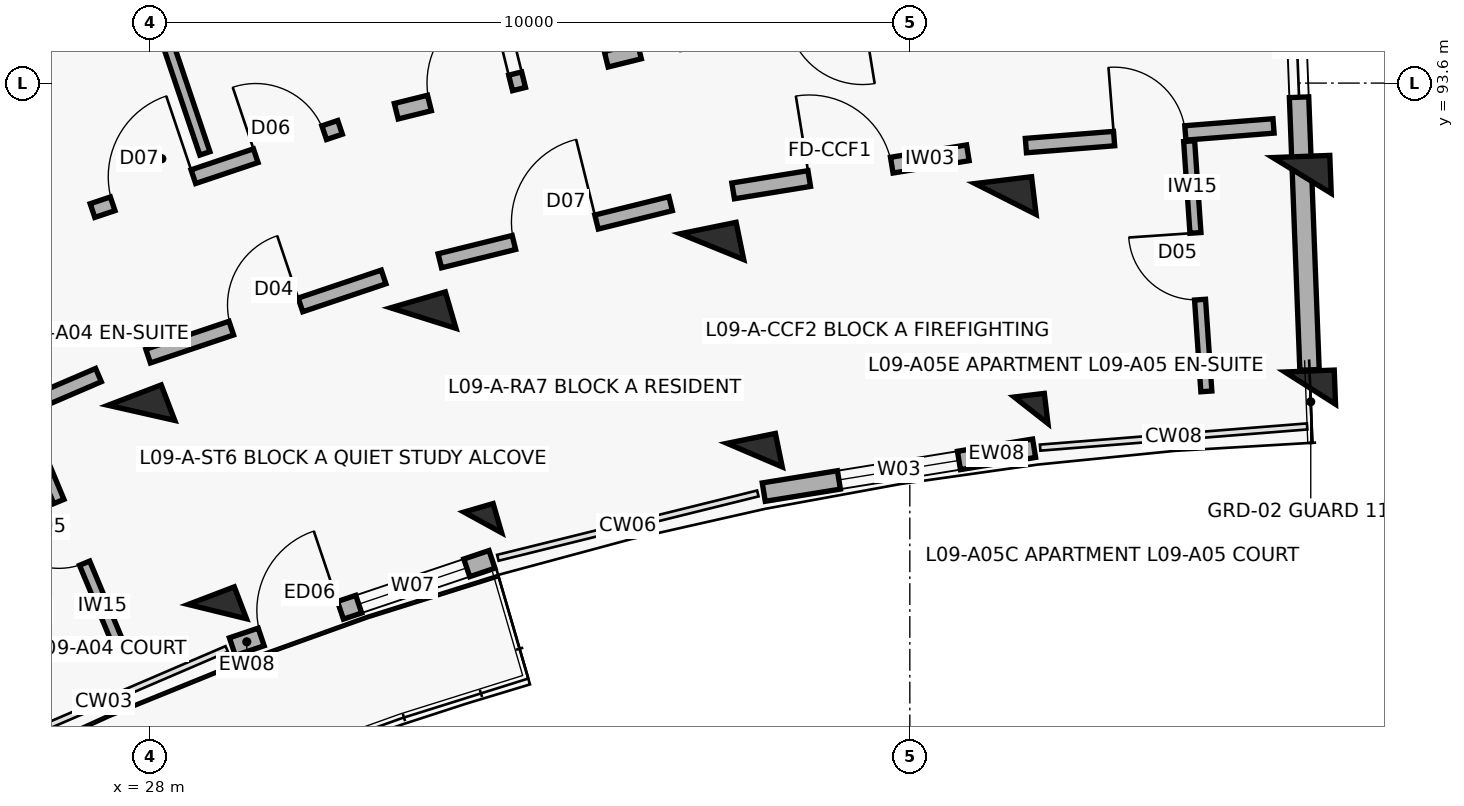
"""IFC4 building model, lengths in metres.
Left out: names, types, materials, properties, quantities, classifications, styles, units other than length and angle.
Written with IfcOpenShell. Run it as: python <this file> out.ifc"""

import sys

from ifc_helpers import new_model, si_unit, direction, frame, frame_2d, origin, origin_2d, place, context, subcontext, project, spatial, rectangle, extrude, element, fill, save


model = new_model("IFC4")
c1 = context("Model", 3, precision=1e-05, world=origin(), true_north=direction((0.0, 1.0)))
c2 = subcontext(c1, "Body", "Model", "MODEL_VIEW")
j1 = project(units=[si_unit("LENGTHUNIT", "METRE"), si_unit("PLANEANGLEUNIT", "RADIAN")], contexts=[c1])
p1 = place(None, origin())
s1 = spatial("IfcSite", under=j1, at=p1, CompositionType="ELEMENT")
p2 = place(p1, origin())
s2 = spatial("IfcBuilding", under=s1, at=p2, CompositionType="ELEMENT")
p3 = place(p2, frame((0.0, 0.0, 29.8)))
s3 = spatial("IfcBuildingStorey", under=s2, at=p3, CompositionType="ELEMENT", Elevation=29.8)
p4 = place(p3, frame((28.889, 86.646, 0.0), z_axis=(0.0, 0.0, 1.0), x_axis=(-0.357064076459, 0.934079892355, 0.0)))
e1 = element("IfcColumn", 1, at=p4, inside=s3, PredefinedType="COLUMN", context=c2, shape_type="SweptSolid", body=[
    extrude(rectangle(XDim=0.45, YDim=0.65, at=origin_2d()), origin(), (0.0, 0.0, 1.0), 3.1),
])
p5 = place(p3, frame((27.889, 89.261, 0.0), z_axis=(0.0, 0.0, 1.0), x_axis=(-0.357064076459, 0.934079892355, 0.0)))
e2 = element("IfcColumn", 2, at=p5, inside=s3, PredefinedType="COLUMN", context=c2, shape_type="SweptSolid", body=[
    extrude(rectangle(XDim=0.5, YDim=0.75, at=origin_2d()), origin(), (0.0, 0.0, 1.0), 3.1),
])
p6 = place(p3, frame((32.382, 87.82, 0.0), z_axis=(0.0, 0.0, 1.0), x_axis=(-0.27966144946, 0.96009867914, 0.0)))
e3 = element("IfcColumn", 3, at=p6, inside=s3, PredefinedType="COLUMN", context=c2, shape_type="SweptSolid", body=[
    extrude(rectangle(XDim=0.4, YDim=0.4, at=origin_2d()), origin(), (0.0, 0.0, 1.0), 3.1),
])
p7 = place(p3, frame((31.599, 90.508, 0.0), z_axis=(0.0, 0.0, 1.0), x_axis=(-0.27966144946, 0.96009867914, 0.0)))
e4 = element("IfcColumn", 4, at=p7, inside=s3, PredefinedType="COLUMN", context=c2, shape_type="SweptSolid", body=[
    extrude(rectangle(XDim=0.5, YDim=0.75, at=origin_2d()), origin(), (0.0, 0.0, 1.0), 3.1),
])
p8 = place(p3, frame((35.958, 88.705, 0.0), z_axis=(0.0, 0.0, 1.0), x_axis=(-0.200393999665, 0.979715389742, 0.0)))
e5 = element("IfcColumn", 5, at=p8, inside=s3, PredefinedType="COLUMN", context=c2, shape_type="SweptSolid", body=[
    extrude(rectangle(XDim=0.45, YDim=0.65, at=origin_2d()), origin(), (0.0, 0.0, 1.0), 3.1),
])
p9 = place(p3, frame((35.397, 91.448, 0.0), z_axis=(0.0, 0.0, 1.0), x_axis=(-0.200393999665, 0.979715389742, 0.0)))
e6 = element("IfcColumn", 6, at=p9, inside=s3, PredefinedType="COLUMN", context=c2, shape_type="SweptSolid", body=[
    extrude(rectangle(XDim=0.5, YDim=0.75, at=origin_2d()), origin(), (0.0, 0.0, 1.0), 3.1),
])
p10 = place(p3, frame((39.595, 89.295, 0.0), z_axis=(0.0, 0.0, 1.0), x_axis=(-0.119790293837, 0.992799217114, 0.0)))
e7 = element("IfcColumn", 7, at=p10, inside=s3, PredefinedType="COLUMN", context=c2, shape_type="SweptSolid", body=[
    extrude(rectangle(XDim=0.4, YDim=0.4, at=origin_2d()), origin(), (0.0, 0.0, 1.0), 3.1),
])
p11 = place(p3, frame((39.26, 92.075, 0.0), z_axis=(0.0, 0.0, 1.0), x_axis=(-0.119790293837, 0.992799217114, 0.0)))
e8 = element("IfcColumn", 8, at=p11, inside=s3, PredefinedType="COLUMN", context=c2, shape_type="SweptSolid", body=[
    extrude(rectangle(XDim=0.5, YDim=0.75, at=origin_2d()), origin(), (0.0, 0.0, 1.0), 3.1),
])
p12 = place(p3, frame((43.268, 89.587, 0.0), z_axis=(0.0, 0.0, 1.0), x_axis=(-0.038387809088, 0.999262916411, 0.0)))
e9 = element("IfcColumn", 9, at=p12, inside=s3, PredefinedType="COLUMN", context=c2, shape_type="SweptSolid", body=[
    extrude(rectangle(XDim=0.45, YDim=0.65, at=origin_2d()), origin(), (0.0, 0.0, 1.0), 3.1),
])
p13 = place(p3, frame((43.16, 92.385, 0.0), z_axis=(0.0, 0.0, 1.0), x_axis=(-0.038387809088, 0.999262916411, 0.0)))
e10 = element("IfcColumn", 10, at=p13, inside=s3, PredefinedType="COLUMN", context=c2, shape_type="SweptSolid", body=[
    extrude(rectangle(XDim=0.5, YDim=0.75, at=origin_2d()), origin(), (0.0, 0.0, 1.0), 3.1),
])
p14 = place(p3, frame((29.087, 86.185, 0.0), z_axis=(0.0, 0.0, 1.0), x_axis=(0.947880824442, 0.318625081649, 0.0)))
e11 = element("IfcWall", 11, at=p14, inside=s3, PredefinedType="SOLIDWALL", context=c2, shape_type="SweptSolid", body=[
    extrude(rectangle(XDim=3.604, YDim=0.245, at=frame_2d((1.802, 0.0))), origin(), (0.0, 0.0, 1.0), 2.25),
])
p15 = place(p14, frame((0.4, 0.0, 0.0)))
e12 = element("IfcOpeningElement", 12, at=p15, cuts=e11, PredefinedType="OPENING", context=c2, shape_type="SweptSolid", body=[
    extrude(rectangle(XDim=1.1, YDim=2.15, at=frame_2d((0.55, 1.075))), frame((0.0, 0.133, 0.0), z_axis=(0.0, -1.0, 0.0), x_axis=(1.0, 0.0, 0.0)), (0.0, 0.0, 1.0), 0.265),
])
p16 = place(p14, frame((1.754, 0.0, 0.35)))
e13 = element("IfcOpeningElement", 13, at=p16, cuts=e11, PredefinedType="OPENING", context=c2, shape_type="SweptSolid", body=[
    extrude(rectangle(XDim=1.5, YDim=1.65, at=frame_2d((0.75, 0.825))), frame((0.0, 0.133, 0.0), z_axis=(0.0, -1.0, 0.0), x_axis=(1.0, 0.0, 0.0)), (0.0, 0.0, 1.0), 0.265),
])
p17 = place(p3, frame((36.078, 88.218, 0.0), z_axis=(0.0, 0.0, 1.0), x_axis=(0.987080874485, 0.160222804952, 0.0)))
e14 = element("IfcWall", 14, at=p17, inside=s3, PredefinedType="SOLIDWALL", context=c2, shape_type="SweptSolid", body=[
    extrude(rectangle(XDim=3.604, YDim=0.245, at=frame_2d((1.802, 0.0))), origin(), (0.0, 0.0, 1.0), 2.25),
])
p18 = place(p17, frame((1.002, 0.0, 0.32)))
e15 = element("IfcOpeningElement", 15, at=p18, cuts=e14, PredefinedType="OPENING", context=c2, shape_type="SweptSolid", body=[
    extrude(rectangle(XDim=1.6, YDim=1.5, at=frame_2d((0.8, 0.75))), frame((0.0, 0.133, 0.0), z_axis=(0.0, -1.0, 0.0), x_axis=(1.0, 0.0, 0.0)), (0.0, 0.0, 1.0), 0.265),
])
p19 = place(p3, frame((43.259, 89.827, 0.0), z_axis=(0.0, 0.0, 1.0), x_axis=(-0.038407966241, 0.999262141847, 0.0)))
e16 = element("IfcWall", 16, at=p19, inside=s3, PredefinedType="SOLIDWALL", context=c2, shape_type="SweptSolid", body=[
    extrude(rectangle(XDim=8.2, YDim=0.255, at=frame_2d((4.1, 0.0))), origin(), (0.0, 0.0, 1.0), 2.18),
])
p20 = place(p19, frame((3.59, 0.0, 0.75)))
e17 = element("IfcOpeningElement", 17, at=p20, cuts=e16, PredefinedType="OPENING", context=c2, shape_type="SweptSolid", body=[
    extrude(rectangle(XDim=1.35, YDim=1.35, at=frame_2d((0.675, 0.675))), frame((0.0, 0.137, 0.0), z_axis=(0.0, -1.0, 0.0), x_axis=(1.0, 0.0, 0.0)), (0.0, 0.0, 1.0), 0.275),
])
p21 = place(p3, frame((24.322, 88.467, 0.0), z_axis=(0.0, 0.0, 1.0), x_axis=(0.918723391052, 0.394901672235, 0.0)))
e18 = element("IfcWall", 18, at=p21, inside=s3, PredefinedType="SOLIDWALL", context=c2, shape_type="SweptSolid", body=[
    extrude(rectangle(XDim=3.269, YDim=0.19, at=frame_2d((1.634, 0.0))), origin(), (0.0, 0.0, 1.0), 2.08),
])
p22 = place(p21, frame((1.164, 0.0, 0.0)))
e19 = element("IfcOpeningElement", 19, at=p22, cuts=e18, PredefinedType="OPENING", context=c2, shape_type="SweptSolid", body=[
    extrude(rectangle(XDim=0.94, YDim=2.1, at=frame_2d((0.47, 1.05))), frame((0.0, 0.105, 0.0), z_axis=(0.0, -1.0, 0.0), x_axis=(1.0, 0.0, 0.0)), (0.0, 0.0, 1.0), 0.21),
])
p23 = place(p3, frame((27.609, 86.166, 0.0), z_axis=(0.0, 0.0, 1.0), x_axis=(-0.385151143297, 0.922853507777, 0.0)))
e20 = element("IfcWall", 20, at=p23, inside=s3, PredefinedType="PARTITIONING", context=c2, shape_type="SweptSolid", body=[
    extrude(rectangle(XDim=3.3, YDim=0.145, at=frame_2d((1.65, 0.0))), origin(), (0.0, 0.0, 1.0), 2.08),
])
p24 = place(p23, frame((1.21, 0.0, 0.0)))
e21 = element("IfcOpeningElement", 21, at=p24, cuts=e20, PredefinedType="OPENING", context=c2, shape_type="SweptSolid", body=[
    extrude(rectangle(XDim=0.88, YDim=2.1, at=frame_2d((0.44, 1.05))), frame((0.0, 0.083, 0.0), z_axis=(0.0, -1.0, 0.0), x_axis=(1.0, 0.0, 0.0)), (0.0, 0.0, 1.0), 0.165),
])
p25 = place(p3, frame((27.247, 91.923, 0.0), z_axis=(0.0, 0.0, 1.0), x_axis=(0.947863007629, 0.318678080151, 0.0)))
e22 = element("IfcWall", 22, at=p25, inside=s3, PredefinedType="SOLIDWALL", context=c2, shape_type="SweptSolid", body=[
    extrude(rectangle(XDim=3.436, YDim=0.19, at=frame_2d((1.718, 0.0))), origin(), (0.0, 0.0, 1.0), 2.08),
])
p26 = place(p25, frame((0.28, 0.0, 0.0)))
e23 = element("IfcOpeningElement", 23, at=p26, cuts=e22, PredefinedType="OPENING", context=c2, shape_type="SweptSolid", body=[
    extrude(rectangle(XDim=1.12, YDim=2.15, at=frame_2d((0.56, 1.075))), frame((0.0, 0.105, 0.0), z_axis=(0.0, -1.0, 0.0), x_axis=(1.0, 0.0, 0.0)), (0.0, 0.0, 1.0), 0.21),
])
p27 = place(p25, frame((2.266, 0.0, 0.0)))
e24 = element("IfcOpeningElement", 24, at=p27, cuts=e22, PredefinedType="OPENING", context=c2, shape_type="SweptSolid", body=[
    extrude(rectangle(XDim=0.95, YDim=2.1, at=frame_2d((0.475, 1.05))), frame((0.0, 0.105, 0.0), z_axis=(0.0, -1.0, 0.0), x_axis=(1.0, 0.0, 0.0)), (0.0, 0.0, 1.0), 0.21),
])
p28 = place(p3, frame((27.979, 90.008, 0.0), z_axis=(0.0, 0.0, 1.0), x_axis=(0.94787351033, 0.318646839643, 0.0)))
e25 = element("IfcWall", 25, at=p28, inside=s3, PredefinedType="SOLIDWALL", context=c2, shape_type="SweptSolid", body=[
    extrude(rectangle(XDim=3.269, YDim=0.19, at=frame_2d((1.634, 0.0))), origin(), (0.0, 0.0, 1.0), 2.08),
])
p29 = place(p28, frame((1.154, 0.0, 0.0)))
e26 = element("IfcOpeningElement", 26, at=p29, cuts=e25, PredefinedType="OPENING", context=c2, shape_type="SweptSolid", body=[
    extrude(rectangle(XDim=0.96, YDim=2.1, at=frame_2d((0.48, 1.05))), frame((0.0, 0.105, 0.0), z_axis=(0.0, -1.0, 0.0), x_axis=(1.0, 0.0, 0.0)), (0.0, 0.0, 1.0), 0.21),
])
p30 = place(p3, frame((28.725, 92.675, 0.0), z_axis=(0.0, 0.0, 1.0), x_axis=(-0.320057771325, 0.947398027766, 0.0)))
e27 = element("IfcWall", 27, at=p30, inside=s3, PredefinedType="PARTITIONING", context=c2, shape_type="SweptSolid", body=[
    extrude(rectangle(XDim=7.95, YDim=0.14, at=frame_2d((3.975, 0.0))), origin(), (0.0, 0.0, 1.0), 2.08),
])
p31 = place(p30, frame((6.05, 0.0, 0.0)))
e28 = element("IfcOpeningElement", 28, at=p31, cuts=e27, PredefinedType="OPENING", context=c2, shape_type="SweptSolid", body=[
    extrude(rectangle(XDim=0.92, YDim=2.1, at=frame_2d((0.46, 1.05))), frame((0.0, 0.08, 0.0), z_axis=(0.0, -1.0, 0.0), x_axis=(1.0, 0.0, 0.0)), (0.0, 0.0, 1.0), 0.16),
])
p32 = place(p3, frame((31.243, 93.23, 0.0), z_axis=(0.0, 0.0, 1.0), x_axis=(0.970719238682, 0.240216901263, 0.0)))
e29 = element("IfcWall", 29, at=p32, inside=s3, PredefinedType="SOLIDWALL", context=c2, shape_type="SweptSolid", body=[
    extrude(rectangle(XDim=3.296, YDim=0.21, at=frame_2d((1.648, 0.0))), origin(), (0.0, 0.0, 1.0), 2.08),
])
p33 = place(p32, frame((0.45, 0.0, 0.0)))
e30 = element("IfcOpeningElement", 30, at=p33, cuts=e29, PredefinedType="OPENING", context=c2, shape_type="SweptSolid", body=[
    extrude(rectangle(XDim=1.1, YDim=2.15, at=frame_2d((0.55, 1.075))), frame((0.0, 0.115, 0.0), z_axis=(0.0, -1.0, 0.0), x_axis=(1.0, 0.0, 0.0)), (0.0, 0.0, 1.0), 0.23),
])
p34 = place(p32, frame((1.726, 0.0, 0.0)))
e31 = element("IfcOpeningElement", 31, at=p34, cuts=e29, PredefinedType="OPENING", context=c2, shape_type="SweptSolid", body=[
    extrude(rectangle(XDim=1.12, YDim=2.15, at=frame_2d((0.56, 1.075))), frame((0.0, 0.115, 0.0), z_axis=(0.0, -1.0, 0.0), x_axis=(1.0, 0.0, 0.0)), (0.0, 0.0, 1.0), 0.23),
])
p35 = place(p3, frame((31.816, 91.262, 0.0), z_axis=(0.0, 0.0, 1.0), x_axis=(0.970727194092, 0.240184751078, 0.0)))
e32 = element("IfcWall", 32, at=p35, inside=s3, PredefinedType="SOLIDWALL", context=c2, shape_type="SweptSolid", body=[
    extrude(rectangle(XDim=3.129, YDim=0.19, at=frame_2d((1.564, 0.0))), origin(), (0.0, 0.0, 1.0), 2.08),
])
p36 = place(p35, frame((1.004, 0.0, 0.0)))
e33 = element("IfcOpeningElement", 33, at=p36, cuts=e32, PredefinedType="OPENING", context=c2, shape_type="SweptSolid", body=[
    extrude(rectangle(XDim=1.12, YDim=2.15, at=frame_2d((0.56, 1.075))), frame((0.0, 0.105, 0.0), z_axis=(0.0, -1.0, 0.0), x_axis=(1.0, 0.0, 0.0)), (0.0, 0.0, 1.0), 0.21),
])
p37 = place(p3, frame((35.676, 92.181, 0.0), z_axis=(0.0, 0.0, 1.0), x_axis=(0.98707079686, 0.160284877599, 0.0)))
e34 = element("IfcWall", 34, at=p37, inside=s3, PredefinedType="SOLIDWALL", context=c2, shape_type="SweptSolid", body=[
    extrude(rectangle(XDim=3.129, YDim=0.21, at=frame_2d((1.564, 0.0))), origin(), (0.0, 0.0, 1.0), 2.08),
])
p38 = place(p37, frame((1.014, 0.0, 0.0)))
e35 = element("IfcOpeningElement", 35, at=p38, cuts=e34, PredefinedType="OPENING", context=c2, shape_type="SweptSolid", body=[
    extrude(rectangle(XDim=1.1, YDim=2.15, at=frame_2d((0.55, 1.075))), frame((0.0, 0.115, 0.0), z_axis=(0.0, -1.0, 0.0), x_axis=(1.0, 0.0, 0.0)), (0.0, 0.0, 1.0), 0.23),
])
p39 = place(p3, frame((39.527, 92.778, 0.0), z_axis=(0.0, 0.0, 1.0), x_axis=(0.99686660806, 0.07910098441, 0.0)))
e36 = element("IfcWall", 36, at=p39, inside=s3, PredefinedType="SOLIDWALL", context=c2, shape_type="SweptSolid", body=[
    extrude(rectangle(XDim=3.269, YDim=0.19, at=frame_2d((1.634, 0.0))), origin(), (0.0, 0.0, 1.0), 2.08),
])
p40 = place(p39, frame((1.164, 0.0, 0.0)))
e37 = element("IfcOpeningElement", 37, at=p40, cuts=e36, PredefinedType="OPENING", context=c2, shape_type="SweptSolid", body=[
    extrude(rectangle(XDim=0.94, YDim=2.1, at=frame_2d((0.47, 1.05))), frame((0.0, 0.105, 0.0), z_axis=(0.0, -1.0, 0.0), x_axis=(1.0, 0.0, 0.0)), (0.0, 0.0, 1.0), 0.21),
])
p41 = place(p3, frame((41.901, 89.543, 0.0), z_axis=(0.0, 0.0, 1.0), x_axis=(-0.068581194944, 0.997645538105, 0.0)))
e38 = element("IfcWall", 38, at=p41, inside=s3, PredefinedType="PARTITIONING", context=c2, shape_type="SweptSolid", body=[
    extrude(rectangle(XDim=3.3, YDim=0.145, at=frame_2d((1.65, 0.0))), origin(), (0.0, 0.0, 1.0), 2.08),
])
p42 = place(p41, frame((1.21, 0.0, 0.0)))
e39 = element("IfcOpeningElement", 39, at=p42, cuts=e38, PredefinedType="OPENING", context=c2, shape_type="SweptSolid", body=[
    extrude(rectangle(XDim=0.88, YDim=2.1, at=frame_2d((0.44, 1.05))), frame((0.0, 0.083, 0.0), z_axis=(0.0, -1.0, 0.0), x_axis=(1.0, 0.0, 0.0)), (0.0, 0.0, 1.0), 0.165),
])
p43 = place(p15, origin())
e40 = element("IfcDoor", 40, at=p43, inside=s3, OperationType="SINGLE_SWING_RIGHT", PredefinedType="DOOR", context=c2, shape_type="SweptSolid", body=[
    extrude(rectangle(XDim=1.1, YDim=2.15, at=frame_2d((0.55, 1.075))), frame((0.0, 0.025, 0.0), z_axis=(0.0, -1.0, 0.0), x_axis=(1.0, 0.0, 0.0)), (0.0, 0.0, 1.0), 0.05),
])
fill(e12, e40)
p44 = place(p16, origin())
e41 = element("IfcWindow", 41, at=p44, inside=s3, PartitioningType="DOUBLE_PANEL_VERTICAL", PredefinedType="WINDOW", context=c2, shape_type="SweptSolid", body=[
    extrude(rectangle(XDim=1.5, YDim=1.65, at=frame_2d((0.75, 0.825))), frame((0.0, 0.03, 0.0), z_axis=(0.0, -1.0, 0.0), x_axis=(1.0, 0.0, 0.0)), (0.0, 0.0, 1.0), 0.06),
])
fill(e13, e41)
p45 = place(p18, origin())
e42 = element("IfcWindow", 42, at=p45, inside=s3, PartitioningType="DOUBLE_PANEL_VERTICAL", PredefinedType="WINDOW", context=c2, shape_type="SweptSolid", body=[
    extrude(rectangle(XDim=1.6, YDim=1.5, at=frame_2d((0.8, 0.75))), frame((0.0, 0.03, 0.0), z_axis=(0.0, -1.0, 0.0), x_axis=(1.0, 0.0, 0.0)), (0.0, 0.0, 1.0), 0.06),
])
fill(e15, e42)
p46 = place(p20, origin())
e43 = element("IfcWindow", 43, at=p46, inside=s3, PartitioningType="DOUBLE_PANEL_VERTICAL", PredefinedType="WINDOW", context=c2, shape_type="SweptSolid", body=[
    extrude(rectangle(XDim=1.35, YDim=1.35, at=frame_2d((0.675, 0.675))), frame((0.0, 0.03, 0.0), z_axis=(0.0, -1.0, 0.0), x_axis=(1.0, 0.0, 0.0)), (0.0, 0.0, 1.0), 0.06),
])
fill(e17, e43)
p47 = place(p24, origin())
e44 = element("IfcDoor", 44, at=p47, inside=s3, OperationType="SINGLE_SWING_RIGHT", PredefinedType="DOOR", context=c2, shape_type="SweptSolid", body=[
    extrude(rectangle(XDim=0.88, YDim=2.1, at=frame_2d((0.44, 1.05))), frame((0.0, 0.025, 0.0), z_axis=(0.0, -1.0, 0.0), x_axis=(1.0, 0.0, 0.0)), (0.0, 0.0, 1.0), 0.05),
])
fill(e21, e44)
p48 = place(p26, origin())
e45 = element("IfcDoor", 45, at=p48, inside=s3, OperationType="SINGLE_SWING_RIGHT", PredefinedType="DOOR", context=c2, shape_type="SweptSolid", body=[
    extrude(rectangle(XDim=1.12, YDim=2.15, at=frame_2d((0.56, 1.075))), frame((0.0, 0.025, 0.0), z_axis=(0.0, -1.0, 0.0), x_axis=(1.0, 0.0, 0.0)), (0.0, 0.0, 1.0), 0.05),
])
fill(e23, e45)
p49 = place(p27, origin())
e46 = element("IfcDoor", 46, at=p49, inside=s3, OperationType="SINGLE_SWING_LEFT", PredefinedType="DOOR", context=c2, shape_type="SweptSolid", body=[
    extrude(rectangle(XDim=0.95, YDim=2.1, at=frame_2d((0.475, 1.05))), frame((0.0, 0.025, 0.0), z_axis=(0.0, -1.0, 0.0), x_axis=(1.0, 0.0, 0.0)), (0.0, 0.0, 1.0), 0.05),
])
fill(e24, e46)
p50 = place(p29, origin())
e47 = element("IfcDoor", 47, at=p50, inside=s3, OperationType="SINGLE_SWING_RIGHT", PredefinedType="DOOR", context=c2, shape_type="SweptSolid", body=[
    extrude(rectangle(XDim=0.96, YDim=2.1, at=frame_2d((0.48, 1.05))), frame((0.0, 0.025, 0.0), z_axis=(0.0, -1.0, 0.0), x_axis=(1.0, 0.0, 0.0)), (0.0, 0.0, 1.0), 0.05),
])
fill(e26, e47)
p51 = place(p33, origin())
e48 = element("IfcDoor", 48, at=p51, inside=s3, OperationType="SINGLE_SWING_RIGHT", PredefinedType="DOOR", context=c2, shape_type="SweptSolid", body=[
    extrude(rectangle(XDim=1.1, YDim=2.15, at=frame_2d((0.55, 1.075))), frame((0.0, 0.025, 0.0), z_axis=(0.0, -1.0, 0.0), x_axis=(1.0, 0.0, 0.0)), (0.0, 0.0, 1.0), 0.05),
])
fill(e30, e48)
p52 = place(p34, origin())
e49 = element("IfcDoor", 49, at=p52, inside=s3, OperationType="SINGLE_SWING_LEFT", PredefinedType="DOOR", context=c2, shape_type="SweptSolid", body=[
    extrude(rectangle(XDim=1.12, YDim=2.15, at=frame_2d((0.56, 1.075))), frame((0.0, 0.025, 0.0), z_axis=(0.0, -1.0, 0.0), x_axis=(1.0, 0.0, 0.0)), (0.0, 0.0, 1.0), 0.05),
])
fill(e31, e49)
p53 = place(p36, origin())
e50 = element("IfcDoor", 50, at=p53, inside=s3, OperationType="SINGLE_SWING_RIGHT", PredefinedType="DOOR", context=c2, shape_type="SweptSolid", body=[
    extrude(rectangle(XDim=1.12, YDim=2.15, at=frame_2d((0.56, 1.075))), frame((0.0, 0.025, 0.0), z_axis=(0.0, -1.0, 0.0), x_axis=(1.0, 0.0, 0.0)), (0.0, 0.0, 1.0), 0.05),
])
fill(e33, e50)
p54 = place(p38, origin())
e51 = element("IfcDoor", 51, at=p54, inside=s3, OperationType="SINGLE_SWING_LEFT", PredefinedType="DOOR", context=c2, shape_type="SweptSolid", body=[
    extrude(rectangle(XDim=1.1, YDim=2.15, at=frame_2d((0.55, 1.075))), frame((0.0, 0.025, 0.0), z_axis=(0.0, -1.0, 0.0), x_axis=(1.0, 0.0, 0.0)), (0.0, 0.0, 1.0), 0.05),
])
fill(e35, e51)
p55 = place(p40, origin())
e52 = element("IfcDoor", 52, at=p55, inside=s3, OperationType="SINGLE_SWING_LEFT", PredefinedType="DOOR", context=c2, shape_type="SweptSolid", body=[
    extrude(rectangle(XDim=0.94, YDim=2.1, at=frame_2d((0.47, 1.05))), frame((0.0, 0.025, 0.0), z_axis=(0.0, -1.0, 0.0), x_axis=(1.0, 0.0, 0.0)), (0.0, 0.0, 1.0), 0.05),
])
fill(e37, e52)
p56 = place(p42, origin())
e53 = element("IfcDoor", 53, at=p56, inside=s3, OperationType="SINGLE_SWING_RIGHT", PredefinedType="DOOR", context=c2, shape_type="SweptSolid", body=[
    extrude(rectangle(XDim=0.88, YDim=2.1, at=frame_2d((0.44, 1.05))), frame((0.0, 0.025, 0.0), z_axis=(0.0, -1.0, 0.0), x_axis=(1.0, 0.0, 0.0)), (0.0, 0.0, 1.0), 0.05),
])
fill(e39, e53)
save(model, sys.argv[1])
